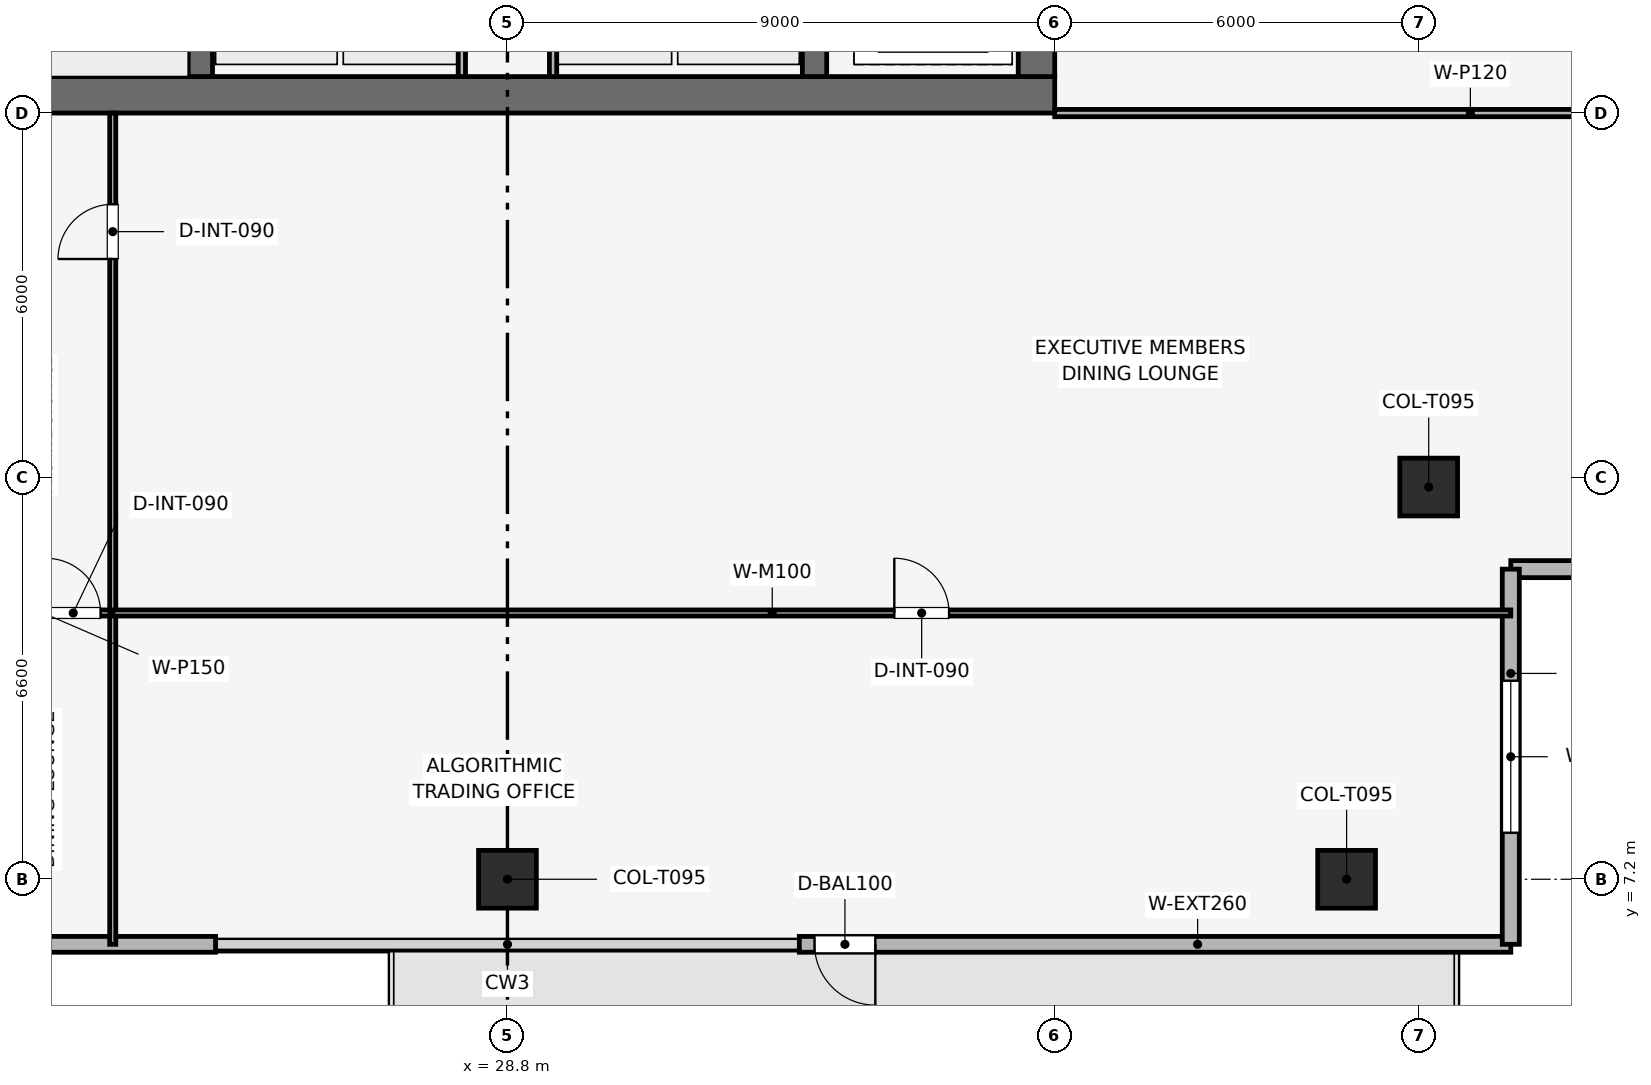
"""IFC4 building model, lengths in metres.
Left out: names, types, materials, properties, quantities, classifications, styles, units other than length and angle.
Written with IfcOpenShell. Run it as: python <this file> out.ifc"""

import sys

from ifc_helpers import new_model, si_unit, direction, frame, frame_2d, origin, origin_2d, place, context, subcontext, project, spatial, rectangle, extrude, element, fill, save


model = new_model("IFC4")
c1 = context("Model", 3, precision=1e-05, world=origin(), true_north=direction((0.0, 1.0)))
c2 = subcontext(c1, "Body", "Model", "MODEL_VIEW")
j1 = project(units=[si_unit("LENGTHUNIT", "METRE"), si_unit("PLANEANGLEUNIT", "RADIAN")], contexts=[c1])
p1 = place(None, origin())
s1 = spatial("IfcSite", under=j1, at=p1, CompositionType="ELEMENT")
p2 = place(p1, origin())
s2 = spatial("IfcBuilding", under=s1, at=p2, CompositionType="ELEMENT")
p3 = place(p2, frame((0.0, 0.0, 321.75)))
s3 = spatial("IfcBuildingStorey", under=s2, at=p3, CompositionType="ELEMENT", Elevation=321.75)
p4 = place(p3, frame((19.8, 20.1, 0.0), z_axis=(0.0, 0.0, 1.0), x_axis=(1.0, 0.0, 0.0)))
e1 = element("IfcWall", 1, at=p4, inside=s3, PredefinedType="SHEAR", context=c2, shape_type="SweptSolid", body=[
    extrude(rectangle(XDim=18.0, YDim=0.6, at=frame_2d((9.0, 0.0))), origin(), (0.0, 0.0, 1.0), 3.75),
])
p5 = place(p3, frame((37.5, 20.4, 0.0), z_axis=(0.0, 0.0, 1.0), x_axis=(0.0, 1.0, 0.0)))
e2 = element("IfcWall", 2, at=p5, inside=s3, PredefinedType="SHEAR", context=c2, shape_type="SweptSolid", body=[
    extrude(rectangle(XDim=16.8, YDim=0.6, at=frame_2d((8.4, 0.0))), origin(), (0.0, 0.0, 1.0), 3.75),
])
p6 = place(p5, frame((4.9, 0.0, 0.0)))
e3 = element("IfcOpeningElement", 3, at=p6, cuts=e2, PredefinedType="OPENING", context=c2, shape_type="SweptSolid", body=[
    extrude(rectangle(XDim=1.1, YDim=2.15, at=frame_2d((0.55, 1.075))), frame((0.0, 0.31, 0.0), z_axis=(0.0, -1.0, 0.0), x_axis=(1.0, 0.0, 0.0)), (0.0, 0.0, 1.0), 0.62),
])
for number, where, z_axis, x_axis in (
    (4, (23.75, 20.4, 0.0), (0.0, 0.0, 1.0), (0.0, 1.0, 0.0)),
    (5, (33.85, 20.4, 0.0), (0.0, 0.0, 1.0), (0.0, 1.0, 0.0)),
):
    element("IfcWall", number, at=place(p3, frame(where, z_axis=z_axis, x_axis=x_axis)), inside=s3, PredefinedType="SHEAR", context=c2, shape_type="SweptSolid", body=[
        extrude(rectangle(XDim=16.8, YDim=0.4, at=frame_2d((8.4, 0.0))), origin(), (0.0, 0.0, 1.0), 3.75),
    ])
for number, where, z_axis, x_axis in (
    (6, (28.8, 7.2, 0.003), (0.0, 0.0, 1.0), (1.0, 0.0, 0.0)),
    (7, (42.6, 7.2, 0.003), (0.0, 0.0, 1.0), (1.0, 0.0, 0.0)),
    (8, (43.95, 13.65, 0.003), (0.0, 0.0, 1.0), (1.0, 0.0, 0.0)),
):
    element("IfcColumn", number, at=place(p3, frame(where, z_axis=z_axis, x_axis=x_axis)), inside=s3, PredefinedType="COLUMN", context=c2, shape_type="SweptSolid", body=[
        extrude(rectangle(XDim=0.95, YDim=0.95, at=origin_2d()), origin(), (0.0, 0.0, 1.0), 3.504),
    ])
p7 = place(p3, frame((45.3, 6.13, 0.0), z_axis=(0.0, 0.0, 1.0), x_axis=(-1.0, 0.0, 0.0)))
e9 = element("IfcWall", 9, at=p7, inside=s3, PredefinedType="SOLIDWALL", context=c2, shape_type="SweptSolid", body=[
    extrude(rectangle(XDim=11.7, YDim=0.26, at=frame_2d((5.85, 0.0))), origin(), (0.0, 0.0, 1.0), 3.51),
])
p8 = place(p7, frame((10.45, 0.0, 0.0)))
e10 = element("IfcOpeningElement", 10, at=p8, cuts=e9, PredefinedType="OPENING", context=c2, shape_type="SweptSolid", body=[
    extrude(rectangle(XDim=1.0, YDim=2.2, at=frame_2d((0.5, 1.1))), frame((0.0, 0.14, 0.0), z_axis=(0.0, -1.0, 0.0), x_axis=(1.0, 0.0, 0.0)), (0.0, 0.0, 1.0), 0.28),
])
p9 = place(p3, frame((24.0, 6.13, 0.0), z_axis=(0.0, 0.0, 1.0), x_axis=(-1.0, 0.0, 0.0)))
e11 = element("IfcWall", 11, at=p9, inside=s3, PredefinedType="SOLIDWALL", context=c2, shape_type="SweptSolid", body=[
    extrude(rectangle(XDim=11.7, YDim=0.26, at=frame_2d((5.85, 0.0))), origin(), (0.0, 0.0, 1.0), 3.51),
])
p10 = place(p9, frame((5.964, 0.0, 0.9)))
e12 = element("IfcOpeningElement", 12, at=p10, cuts=e11, PredefinedType="OPENING", context=c2, shape_type="SweptSolid", body=[
    extrude(rectangle(XDim=1.2, YDim=2.1, at=frame_2d((0.6, 1.05))), frame((0.0, 0.14, 0.0), z_axis=(0.0, -1.0, 0.0), x_axis=(1.0, 0.0, 0.0)), (0.0, 0.0, 1.0), 0.28),
])
p11 = place(p3, frame((51.47, 12.3, 0.0), z_axis=(0.0, 0.0, 1.0), x_axis=(-1.0, 0.0, 0.0)))
e13 = element("IfcWall", 13, at=p11, inside=s3, PredefinedType="SOLIDWALL", context=c2, shape_type="SweptSolid", body=[
    extrude(rectangle(XDim=6.17, YDim=0.28, at=frame_2d((3.085, 0.0))), origin(), (0.0, 0.0, 1.0), 3.51),
])
p12 = place(p11, frame((1.835, 0.0, 0.9)))
e14 = element("IfcOpeningElement", 14, at=p12, cuts=e13, PredefinedType="OPENING", context=c2, shape_type="SweptSolid", body=[
    extrude(rectangle(XDim=2.5, YDim=1.9, at=frame_2d((1.25, 0.95))), frame((0.0, 0.15, 0.0), z_axis=(0.0, -1.0, 0.0), x_axis=(1.0, 0.0, 0.0)), (0.0, 0.0, 1.0), 0.3),
])
p13 = place(p3, frame((45.3, 12.3, 0.0), z_axis=(0.0, 0.0, 1.0), x_axis=(0.0, -1.0, 0.0)))
e15 = element("IfcWall", 15, at=p13, inside=s3, PredefinedType="SOLIDWALL", context=c2, shape_type="SweptSolid", body=[
    extrude(rectangle(XDim=6.17, YDim=0.28, at=frame_2d((3.085, 0.0))), origin(), (0.0, 0.0, 1.0), 3.51),
])
p14 = place(p13, frame((1.835, 0.0, 0.9)))
e16 = element("IfcOpeningElement", 16, at=p14, cuts=e15, PredefinedType="OPENING", context=c2, shape_type="SweptSolid", body=[
    extrude(rectangle(XDim=2.5, YDim=1.9, at=frame_2d((1.25, 0.95))), frame((0.0, 0.15, 0.0), z_axis=(0.0, -1.0, 0.0), x_axis=(1.0, 0.0, 0.0)), (0.0, 0.0, 1.0), 0.3),
])
for number, where, z_axis, x_axis in (
    (17, (28.05, 20.4, 0.0), (0.0, 0.0, 1.0), (0.0, 1.0, 0.0)),
    (18, (29.55, 20.4, 0.0), (0.0, 0.0, 1.0), (0.0, 1.0, 0.0)),
):
    element("IfcWall", number, at=place(p3, frame(where, z_axis=z_axis, x_axis=x_axis)), inside=s3, PredefinedType="PARTITIONING", context=c2, shape_type="SweptSolid", body=[
        extrude(rectangle(XDim=2.75, YDim=0.12, at=frame_2d((1.375, 0.0))), origin(), (0.0, 0.0, 1.0), 3.51),
    ])
p15 = place(p3, frame((19.8, 11.579, 0.0), z_axis=(0.0, 0.0, 1.0), x_axis=(1.0, 0.0, 0.0)))
e19 = element("IfcWall", 19, at=p15, inside=s3, PredefinedType="MOVABLE", context=c2, shape_type="SweptSolid", body=[
    extrude(rectangle(XDim=2.509, YDim=0.1, at=frame_2d((1.254, 0.0))), origin(), (0.0, 0.0, 1.0), 3.095),
])
p16 = place(p15, frame((1.409, 0.0, 0.0)))
e20 = element("IfcOpeningElement", 20, at=p16, cuts=e19, PredefinedType="OPENING", context=c2, shape_type="SweptSolid", body=[
    extrude(rectangle(XDim=0.9, YDim=2.1, at=frame_2d((0.45, 1.05))), frame((0.0, 0.06, 0.0), z_axis=(0.0, -1.0, 0.0), x_axis=(1.0, 0.0, 0.0)), (0.0, 0.0, 1.0), 0.12),
])
p17 = place(p3, frame((22.309, 6.13, 0.0), z_axis=(0.0, 0.0, 1.0), x_axis=(0.0, 1.0, 0.0)))
e21 = element("IfcWall", 21, at=p17, inside=s3, PredefinedType="MOVABLE", context=c2, shape_type="SweptSolid", body=[
    extrude(rectangle(XDim=13.67, YDim=0.1, at=frame_2d((6.835, 0.0))), origin(), (0.0, 0.0, 1.0), 3.135),
])
p18 = place(p17, frame((11.27, 0.0, 0.0)))
e22 = element("IfcOpeningElement", 22, at=p18, cuts=e21, PredefinedType="OPENING", context=c2, shape_type="SweptSolid", body=[
    extrude(rectangle(XDim=0.9, YDim=2.1, at=frame_2d((0.45, 1.05))), frame((0.0, 0.06, 0.0), z_axis=(0.0, -1.0, 0.0), x_axis=(1.0, 0.0, 0.0)), (0.0, 0.0, 1.0), 0.12),
])
p19 = place(p3, frame((22.309, 11.579, 0.0), z_axis=(0.0, 0.0, 1.0), x_axis=(1.0, 0.0, 0.0)))
e23 = element("IfcWall", 23, at=p19, inside=s3, PredefinedType="MOVABLE", context=c2, shape_type="SweptSolid", body=[
    extrude(rectangle(XDim=22.991, YDim=0.1, at=frame_2d((11.496, 0.0))), origin(), (0.0, 0.0, 1.0), 3.095),
])
p20 = place(p19, frame((12.853, 0.0, 0.0)))
e24 = element("IfcOpeningElement", 24, at=p20, cuts=e23, PredefinedType="OPENING", context=c2, shape_type="SweptSolid", body=[
    extrude(rectangle(XDim=0.9, YDim=2.1, at=frame_2d((0.45, 1.05))), frame((0.0, 0.06, 0.0), z_axis=(0.0, -1.0, 0.0), x_axis=(1.0, 0.0, 0.0)), (0.0, 0.0, 1.0), 0.12),
])
p21 = place(p3, frame((37.8, 19.8, 0.0), z_axis=(0.0, 0.0, 1.0), x_axis=(1.0, 0.0, 0.0)))
e25 = element("IfcWall", 25, at=p21, inside=s3, PredefinedType="PARTITIONING", context=c2, shape_type="SweptSolid", body=[
    extrude(rectangle(XDim=13.67, YDim=0.12, at=frame_2d((6.835, 0.0))), origin(), (0.0, 0.0, 1.0), 3.095),
])
p22 = place(p8, origin())
e26 = element("IfcDoor", 26, at=p22, inside=s3, OperationType="SINGLE_SWING_LEFT", PredefinedType="DOOR", context=c2, shape_type="SweptSolid", body=[
    extrude(rectangle(XDim=1.0, YDim=2.2, at=frame_2d((0.5, 1.1))), frame((0.0, 0.025, 0.0), z_axis=(0.0, -1.0, 0.0), x_axis=(1.0, 0.0, 0.0)), (0.0, 0.0, 1.0), 0.05),
])
fill(e10, e26)
p23 = place(p14, origin())
e27 = element("IfcWindow", 27, at=p23, inside=s3, PartitioningType="SINGLE_PANEL", PredefinedType="WINDOW", context=c2, shape_type="SweptSolid", body=[
    extrude(rectangle(XDim=2.5, YDim=1.9, at=frame_2d((1.25, 0.95))), frame((0.0, 0.03, 0.0), z_axis=(0.0, -1.0, 0.0), x_axis=(1.0, 0.0, 0.0)), (0.0, 0.0, 1.0), 0.06),
])
fill(e16, e27)
p24 = place(p16, origin())
e28 = element("IfcDoor", 28, at=p24, inside=s3, OperationType="SINGLE_SWING_LEFT", PredefinedType="DOOR", context=c2, shape_type="SweptSolid", body=[
    extrude(rectangle(XDim=0.9, YDim=2.1, at=frame_2d((0.45, 1.05))), frame((0.0, 0.025, 0.0), z_axis=(0.0, -1.0, 0.0), x_axis=(1.0, 0.0, 0.0)), (0.0, 0.0, 1.0), 0.05),
])
fill(e20, e28)
p25 = place(p18, origin())
e29 = element("IfcDoor", 29, at=p25, inside=s3, OperationType="SINGLE_SWING_LEFT", PredefinedType="DOOR", context=c2, shape_type="SweptSolid", body=[
    extrude(rectangle(XDim=0.9, YDim=2.1, at=frame_2d((0.45, 1.05))), frame((0.0, 0.025, 0.0), z_axis=(0.0, -1.0, 0.0), x_axis=(1.0, 0.0, 0.0)), (0.0, 0.0, 1.0), 0.05),
])
fill(e22, e29)
p26 = place(p20, origin())
e30 = element("IfcDoor", 30, at=p26, inside=s3, OperationType="SINGLE_SWING_LEFT", PredefinedType="DOOR", context=c2, shape_type="SweptSolid", body=[
    extrude(rectangle(XDim=0.9, YDim=2.1, at=frame_2d((0.45, 1.05))), frame((0.0, 0.025, 0.0), z_axis=(0.0, -1.0, 0.0), x_axis=(1.0, 0.0, 0.0)), (0.0, 0.0, 1.0), 0.05),
])
fill(e24, e30)
save(model, sys.argv[1])
